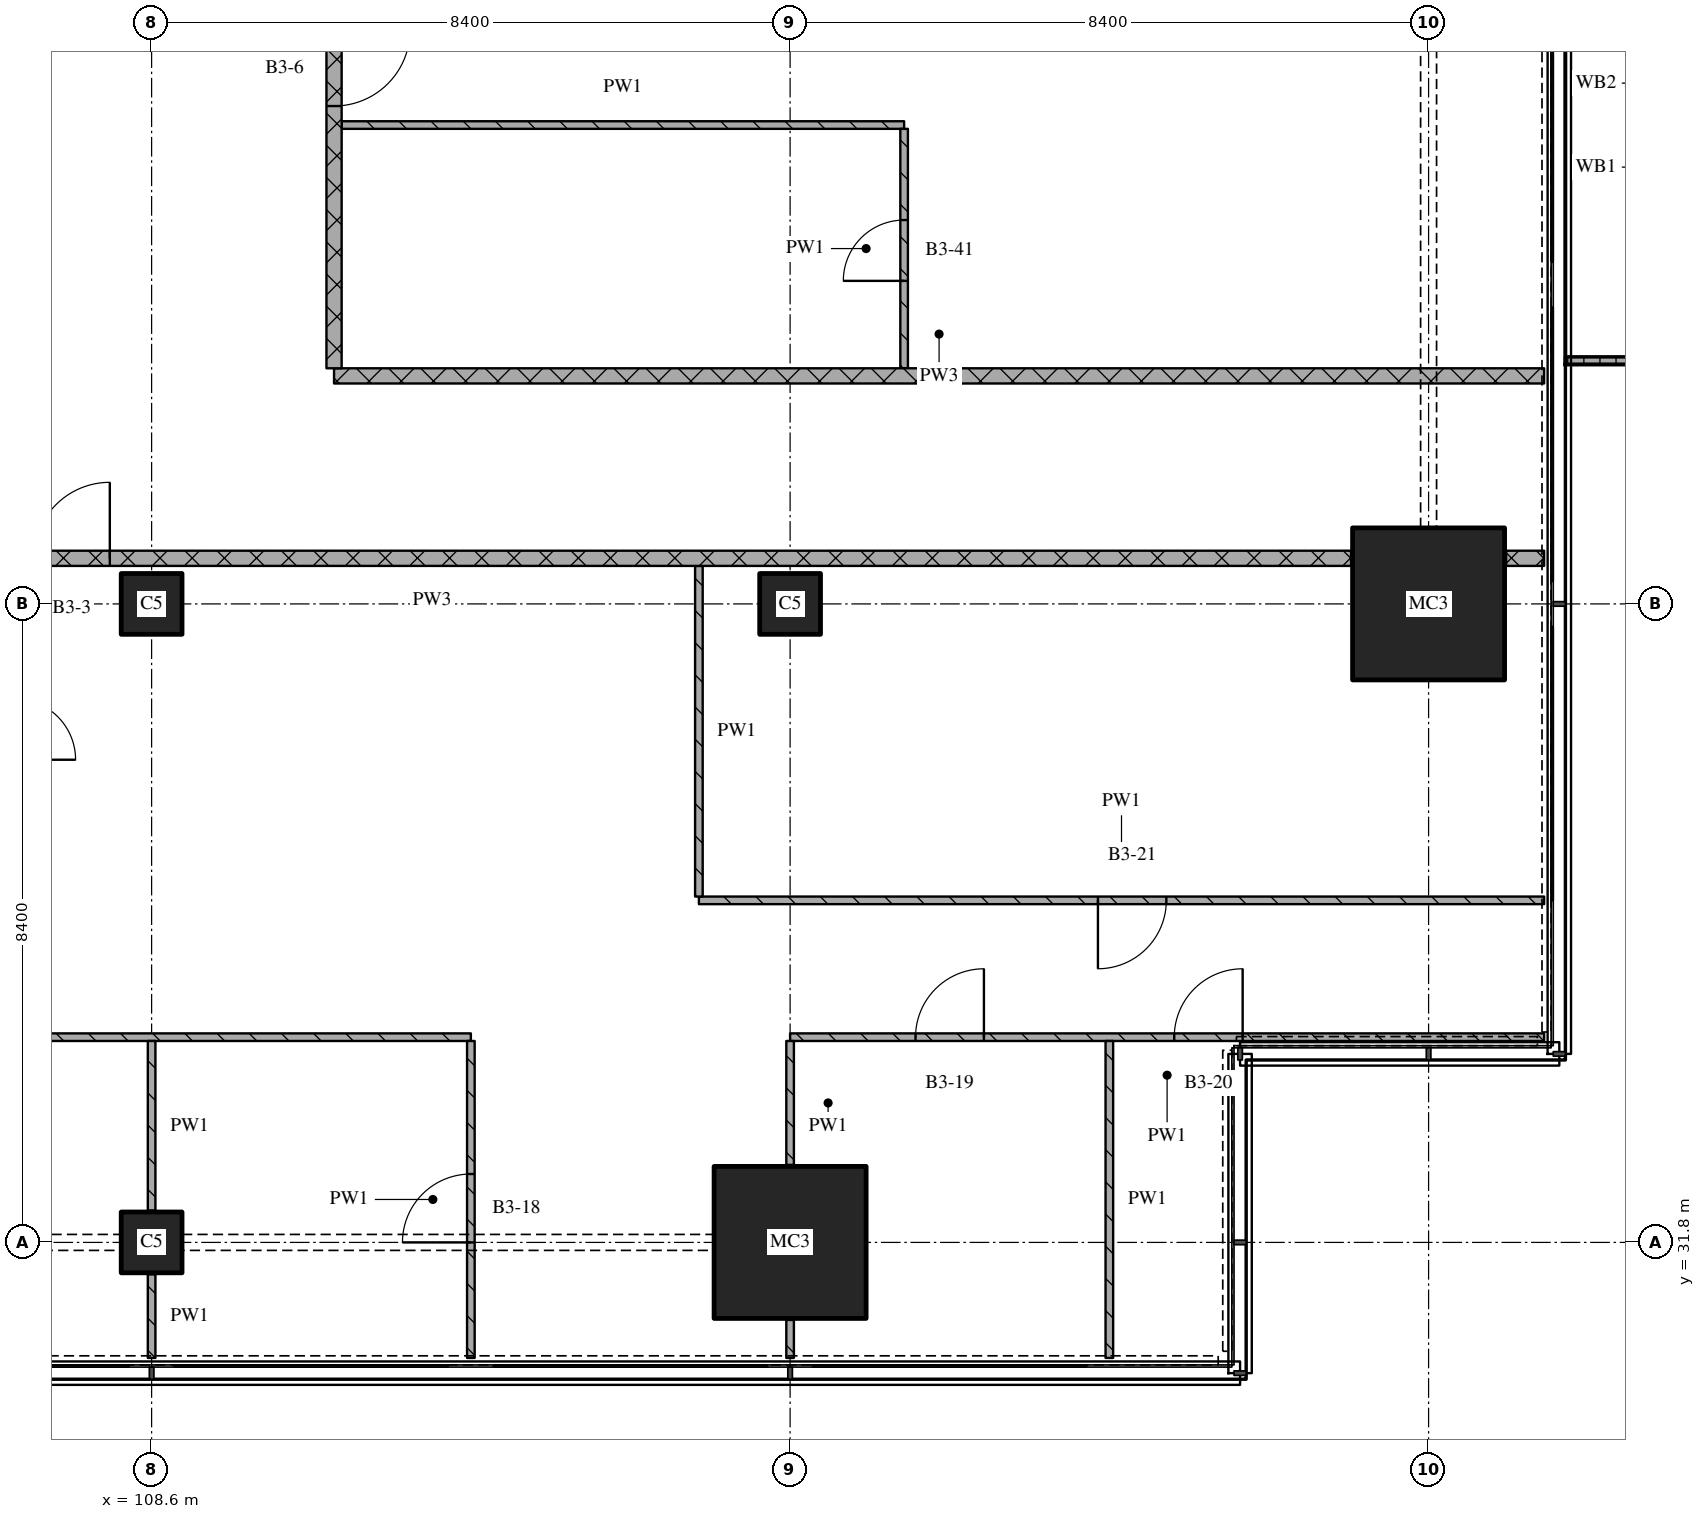
"""IFC4 building model, lengths in metres.
Left out: names, types, materials, properties, quantities, classifications, styles, units other than length and angle.
Written with IfcOpenShell. Run it as: python <this file> out.ifc"""

import sys

from ifc_helpers import new_model, si_unit, direction, frame, frame_2d, origin, origin_2d, place, context, subcontext, project, spatial, polyline, rectangle, outline, extrude, element, fill, save


model = new_model("IFC4")
c1 = context("Model", 3, precision=1e-05, world=origin(), true_north=direction((0.0, 1.0)))
c2 = subcontext(c1, "Body", "Model", "MODEL_VIEW")
j1 = project(units=[si_unit("LENGTHUNIT", "METRE"), si_unit("PLANEANGLEUNIT", "RADIAN")], contexts=[c1])
p1 = place(None, origin())
s1 = spatial("IfcSite", under=j1, at=p1, CompositionType="ELEMENT")
p2 = place(p1, origin())
s2 = spatial("IfcBuilding", under=s1, at=p2, CompositionType="ELEMENT")
p3 = place(p2, frame((0.0, 0.0, 124.05)))
s3 = spatial("IfcBuildingStorey", under=s2, at=p3, CompositionType="ELEMENT", Elevation=124.05)
for number, where, z_axis, x_axis in (
    (1, (108.6, 31.8, 0.0), (0.0, 0.0, 1.0), (1.0, 0.0, 0.0)),
    (2, (108.6, 40.2, 0.0), (0.0, 0.0, 1.0), (1.0, 0.0, 0.0)),
):
    element("IfcColumn", number, at=place(p3, frame(where, z_axis=z_axis, x_axis=x_axis)), inside=s3, PredefinedType="COLUMN", context=c2, shape_type="SweptSolid", body=[
        extrude(rectangle(XDim=0.8, YDim=0.8, at=origin_2d()), origin(), (0.0, 0.0, 1.0), 3.6),
    ])
p4 = place(p3, frame((117.0, 31.8, 0.0), z_axis=(0.0, 0.0, 1.0), x_axis=(1.0, 0.0, 0.0)))
e3 = element("IfcColumn", 3, at=p4, inside=s3, PredefinedType="COLUMN", context=c2, shape_type="SweptSolid", body=[
    extrude(rectangle(XDim=2.0, YDim=2.0, at=origin_2d()), origin(), (0.0, 0.0, 1.0), 3.6),
])
p5 = place(p3, frame((117.0, 40.2, 0.0), z_axis=(0.0, 0.0, 1.0), x_axis=(1.0, 0.0, 0.0)))
e4 = element("IfcColumn", 4, at=p5, inside=s3, PredefinedType="COLUMN", context=c2, shape_type="SweptSolid", body=[
    extrude(rectangle(XDim=0.8, YDim=0.8, at=origin_2d()), origin(), (0.0, 0.0, 1.0), 3.6),
])
p6 = place(p3, frame((125.4, 40.2, 0.0), z_axis=(0.0, 0.0, 1.0), x_axis=(1.0, 0.0, 0.0)))
e5 = element("IfcColumn", 5, at=p6, inside=s3, PredefinedType="COLUMN", context=c2, shape_type="SweptSolid", body=[
    extrude(rectangle(XDim=2.0, YDim=2.0, at=origin_2d()), origin(), (0.0, 0.0, 1.0), 3.6),
])
p7 = place(p3, origin())
e6 = element("IfcWall", 6, at=p7, inside=s3, PredefinedType="SOLIDWALL", context=c2, shape_type="SweptSolid", body=[
    extrude(outline(polyline([(127.2, 43.35), (127.2, 43.45), (128.967, 43.45), (128.967, 49.55), (127.2, 49.55), (127.2, 49.65), (129.067, 49.65), (129.067, 43.35), (127.2, 43.35)])), origin(), (0.0, 0.0, 1.0), 1.0),
])
p8 = place(p3, frame((112.8, 34.5, 0.0), z_axis=(0.0, 0.0, 1.0), x_axis=(-1.0, 0.0, 0.0)))
e7 = element("IfcWall", 7, at=p8, inside=s3, PredefinedType="PARTITIONING", context=c2, shape_type="SweptSolid", body=[
    extrude(rectangle(XDim=12.5, YDim=0.1, at=frame_2d((6.25, 0.0))), origin(), (0.0, 0.0, 1.0), 3.32),
])
p9 = place(p8, frame((7.95, 0.0, 0.0)))
e8 = element("IfcOpeningElement", 8, at=p9, cuts=e7, PredefinedType="OPENING", context=c2, shape_type="SweptSolid", body=[
    extrude(rectangle(XDim=0.9, YDim=2.1, at=frame_2d((0.45, 1.05))), frame((0.0, 0.06, 0.0), z_axis=(0.0, -1.0, 0.0), x_axis=(1.0, 0.0, 0.0)), (0.0, 0.0, 1.0), 0.12),
])
p10 = place(p3, frame((126.92, 34.5, 0.0), z_axis=(0.0, 0.0, 1.0), x_axis=(-1.0, 0.0, 0.0)))
e9 = element("IfcWall", 9, at=p10, inside=s3, PredefinedType="PARTITIONING", context=c2, shape_type="SweptSolid", body=[
    extrude(rectangle(XDim=9.92, YDim=0.1, at=frame_2d((4.96, 0.0))), origin(), (0.0, 0.0, 1.0), 3.32),
])
p11 = place(p10, frame((3.966, 0.0, 0.0)))
e10 = element("IfcOpeningElement", 10, at=p11, cuts=e9, PredefinedType="OPENING", context=c2, shape_type="SweptSolid", body=[
    extrude(rectangle(XDim=0.9, YDim=2.1, at=frame_2d((0.45, 1.05))), frame((0.0, 0.06, 0.0), z_axis=(0.0, -1.0, 0.0), x_axis=(1.0, 0.0, 0.0)), (0.0, 0.0, 1.0), 0.12),
])
p12 = place(p10, frame((7.37, 0.0, 0.0)))
e11 = element("IfcOpeningElement", 11, at=p12, cuts=e9, PredefinedType="OPENING", context=c2, shape_type="SweptSolid", body=[
    extrude(rectangle(XDim=0.9, YDim=2.1, at=frame_2d((0.45, 1.05))), frame((0.0, 0.06, 0.0), z_axis=(0.0, -1.0, 0.0), x_axis=(1.0, 0.0, 0.0)), (0.0, 0.0, 1.0), 0.12),
])
p13 = place(p3, frame((115.8, 36.3, 0.0), z_axis=(0.0, 0.0, 1.0), x_axis=(1.0, 0.0, 0.0)))
e12 = element("IfcWall", 12, at=p13, inside=s3, PredefinedType="PARTITIONING", context=c2, shape_type="SweptSolid", body=[
    extrude(rectangle(XDim=11.12, YDim=0.1, at=frame_2d((5.56, 0.0))), origin(), (0.0, 0.0, 1.0), 3.32),
])
p14 = place(p13, frame((5.25, 0.0, 0.0)))
e13 = element("IfcOpeningElement", 13, at=p14, cuts=e12, PredefinedType="OPENING", context=c2, shape_type="SweptSolid", body=[
    extrude(rectangle(XDim=0.9, YDim=2.1, at=frame_2d((0.45, 1.05))), frame((0.0, 0.06, 0.0), z_axis=(0.0, -1.0, 0.0), x_axis=(1.0, 0.0, 0.0)), (0.0, 0.0, 1.0), 0.12),
])
p15 = place(p3, frame((124.38, 40.8, 0.0), z_axis=(0.0, 0.0, 1.0), x_axis=(-1.0, 0.0, 0.0)))
e14 = element("IfcWall", 14, at=p15, inside=s3, PredefinedType="PARTITIONING", context=c2, shape_type="SweptSolid", body=[
    extrude(rectangle(XDim=24.18, YDim=0.2, at=frame_2d((12.09, 0.0))), origin(), (0.0, 0.0, 1.0), 3.32),
])
p16 = place(p15, frame((16.33, 0.0, 0.0)))
e15 = element("IfcOpeningElement", 15, at=p16, cuts=e14, PredefinedType="OPENING", context=c2, shape_type="SweptSolid", body=[
    extrude(rectangle(XDim=1.0, YDim=2.1, at=frame_2d((0.5, 1.05))), frame((0.0, 0.11, 0.0), z_axis=(0.0, -1.0, 0.0), x_axis=(1.0, 0.0, 0.0)), (0.0, 0.0, 1.0), 0.22),
])
p17 = place(p3, frame((126.42, 40.8, 0.0), z_axis=(0.0, 0.0, 1.0), x_axis=(1.0, 0.0, 0.0)))
e16 = element("IfcWall", 16, at=p17, inside=s3, PredefinedType="PARTITIONING", context=c2, shape_type="SweptSolid", body=[
    extrude(rectangle(XDim=0.5, YDim=0.2, at=frame_2d((0.25, 0.0))), origin(), (0.0, 0.0, 1.0), 3.32),
])
p18 = place(p3, frame((111.0, 43.2, 0.0), z_axis=(0.0, 0.0, 1.0), x_axis=(1.0, 0.0, 0.0)))
e17 = element("IfcWall", 17, at=p18, inside=s3, PredefinedType="PARTITIONING", context=c2, shape_type="SweptSolid", body=[
    extrude(rectangle(XDim=15.92, YDim=0.2, at=frame_2d((7.96, 0.0))), origin(), (0.0, 0.0, 1.0), 3.32),
])
p19 = place(p3, frame((111.1, 46.5, 0.0), z_axis=(0.0, 0.0, 1.0), x_axis=(1.0, 0.0, 0.0)))
e18 = element("IfcWall", 18, at=p19, inside=s3, PredefinedType="PARTITIONING", context=c2, shape_type="SweptSolid", body=[
    extrude(rectangle(XDim=7.4, YDim=0.1, at=frame_2d((3.7, 0.0))), origin(), (0.0, 0.0, 1.0), 3.32),
])
p20 = place(p3, frame((108.6, 31.38, 0.0), z_axis=(0.0, 0.0, 1.0), x_axis=(0.0, -1.0, 0.0)))
e19 = element("IfcWall", 19, at=p20, inside=s3, PredefinedType="PARTITIONING", context=c2, shape_type="SweptSolid", body=[
    extrude(rectangle(XDim=1.1, YDim=0.1, at=frame_2d((0.55, 0.0))), origin(), (0.0, 0.0, 1.0), 3.32),
])
p21 = place(p3, frame((108.6, 34.45, 0.0), z_axis=(0.0, 0.0, 1.0), x_axis=(0.0, -1.0, 0.0)))
e20 = element("IfcWall", 20, at=p21, inside=s3, PredefinedType="PARTITIONING", context=c2, shape_type="SweptSolid", body=[
    extrude(rectangle(XDim=2.23, YDim=0.1, at=frame_2d((1.115, 0.0))), origin(), (0.0, 0.0, 1.0), 3.32),
])
p22 = place(p3, frame((111.0, 75.32, 0.0), z_axis=(0.0, 0.0, 1.0), x_axis=(0.0, -1.0, 0.0)))
e21 = element("IfcWall", 21, at=p22, inside=s3, PredefinedType="PARTITIONING", context=c2, shape_type="SweptSolid", body=[
    extrude(rectangle(XDim=32.02, YDim=0.2, at=frame_2d((16.01, 0.0))), origin(), (0.0, 0.0, 1.0), 3.32),
])
p23 = place(p22, frame((11.37, 0.0, 0.0)))
e22 = element("IfcOpeningElement", 22, at=p23, cuts=e21, PredefinedType="OPENING", context=c2, shape_type="SweptSolid", body=[
    extrude(rectangle(XDim=1.0, YDim=2.1, at=frame_2d((0.5, 1.05))), frame((0.0, 0.11, 0.0), z_axis=(0.0, -1.0, 0.0), x_axis=(1.0, 0.0, 0.0)), (0.0, 0.0, 1.0), 0.22),
])
p24 = place(p22, frame((27.57, 0.0, 0.0)))
e23 = element("IfcOpeningElement", 23, at=p24, cuts=e21, PredefinedType="OPENING", context=c2, shape_type="SweptSolid", body=[
    extrude(rectangle(XDim=1.0, YDim=2.1, at=frame_2d((0.5, 1.05))), frame((0.0, 0.11, 0.0), z_axis=(0.0, -1.0, 0.0), x_axis=(1.0, 0.0, 0.0)), (0.0, 0.0, 1.0), 0.22),
])
p25 = place(p3, frame((112.8, 30.28, 0.0), z_axis=(0.0, 0.0, 1.0), x_axis=(0.0, 1.0, 0.0)))
e24 = element("IfcWall", 24, at=p25, inside=s3, PredefinedType="PARTITIONING", context=c2, shape_type="SweptSolid", body=[
    extrude(rectangle(XDim=4.17, YDim=0.1, at=frame_2d((2.085, 0.0))), origin(), (0.0, 0.0, 1.0), 3.32),
])
p26 = place(p25, frame((1.52, 0.0, 0.0)))
e25 = element("IfcOpeningElement", 25, at=p26, cuts=e24, PredefinedType="OPENING", context=c2, shape_type="SweptSolid", body=[
    extrude(rectangle(XDim=0.9, YDim=2.1, at=frame_2d((0.45, 1.05))), frame((0.0, 0.06, 0.0), z_axis=(0.0, -1.0, 0.0), x_axis=(1.0, 0.0, 0.0)), (0.0, 0.0, 1.0), 0.12),
])
p27 = place(p3, frame((115.8, 40.7, 0.0), z_axis=(0.0, 0.0, 1.0), x_axis=(0.0, -1.0, 0.0)))
e26 = element("IfcWall", 26, at=p27, inside=s3, PredefinedType="PARTITIONING", context=c2, shape_type="SweptSolid", body=[
    extrude(rectangle(XDim=4.35, YDim=0.1, at=frame_2d((2.175, 0.0))), origin(), (0.0, 0.0, 1.0), 3.32),
])
p28 = place(p3, frame((117.0, 30.78, 0.0), z_axis=(0.0, 0.0, 1.0), x_axis=(0.0, -1.0, 0.0)))
e27 = element("IfcWall", 27, at=p28, inside=s3, PredefinedType="PARTITIONING", context=c2, shape_type="SweptSolid", body=[
    extrude(rectangle(XDim=0.5, YDim=0.1, at=frame_2d((0.25, 0.0))), origin(), (0.0, 0.0, 1.0), 3.32),
])
p29 = place(p3, frame((117.0, 34.45, 0.0), z_axis=(0.0, 0.0, 1.0), x_axis=(0.0, -1.0, 0.0)))
e28 = element("IfcWall", 28, at=p29, inside=s3, PredefinedType="PARTITIONING", context=c2, shape_type="SweptSolid", body=[
    extrude(rectangle(XDim=1.63, YDim=0.1, at=frame_2d((0.815, 0.0))), origin(), (0.0, 0.0, 1.0), 3.32),
])
p30 = place(p3, frame((118.5, 43.3, 0.0), z_axis=(0.0, 0.0, 1.0), x_axis=(0.0, 1.0, 0.0)))
e29 = element("IfcWall", 29, at=p30, inside=s3, PredefinedType="PARTITIONING", context=c2, shape_type="SweptSolid", body=[
    extrude(rectangle(XDim=3.15, YDim=0.1, at=frame_2d((1.575, 0.0))), origin(), (0.0, 0.0, 1.0), 3.32),
])
p31 = place(p30, frame((1.15, 0.0, 0.0)))
e30 = element("IfcOpeningElement", 30, at=p31, cuts=e29, PredefinedType="OPENING", context=c2, shape_type="SweptSolid", body=[
    extrude(rectangle(XDim=0.8, YDim=2.1, at=frame_2d((0.4, 1.05))), frame((0.0, 0.06, 0.0), z_axis=(0.0, -1.0, 0.0), x_axis=(1.0, 0.0, 0.0)), (0.0, 0.0, 1.0), 0.12),
])
p32 = place(p3, frame((121.2, 34.45, 0.0), z_axis=(0.0, 0.0, 1.0), x_axis=(0.0, -1.0, 0.0)))
e31 = element("IfcWall", 31, at=p32, inside=s3, PredefinedType="PARTITIONING", context=c2, shape_type="SweptSolid", body=[
    extrude(rectangle(XDim=4.17, YDim=0.1, at=frame_2d((2.085, 0.0))), origin(), (0.0, 0.0, 1.0), 3.32),
])
p33 = place(p11, origin())
e32 = element("IfcDoor", 32, at=p33, inside=s3, OperationType="SINGLE_SWING_RIGHT", PredefinedType="DOOR", context=c2, shape_type="SweptSolid", body=[
    extrude(rectangle(XDim=0.9, YDim=2.1, at=frame_2d((0.45, 1.05))), frame((0.0, 0.025, 0.0), z_axis=(0.0, -1.0, 0.0), x_axis=(1.0, 0.0, 0.0)), (0.0, 0.0, 1.0), 0.05),
])
fill(e10, e32)
p34 = place(p12, origin())
e33 = element("IfcDoor", 33, at=p34, inside=s3, OperationType="SINGLE_SWING_RIGHT", PredefinedType="DOOR", context=c2, shape_type="SweptSolid", body=[
    extrude(rectangle(XDim=0.9, YDim=2.1, at=frame_2d((0.45, 1.05))), frame((0.0, 0.025, 0.0), z_axis=(0.0, -1.0, 0.0), x_axis=(1.0, 0.0, 0.0)), (0.0, 0.0, 1.0), 0.05),
])
fill(e11, e33)
p35 = place(p14, origin())
e34 = element("IfcDoor", 34, at=p35, inside=s3, OperationType="SINGLE_SWING_RIGHT", PredefinedType="DOOR", context=c2, shape_type="SweptSolid", body=[
    extrude(rectangle(XDim=0.9, YDim=2.1, at=frame_2d((0.45, 1.05))), frame((0.0, 0.025, 0.0), z_axis=(0.0, -1.0, 0.0), x_axis=(1.0, 0.0, 0.0)), (0.0, 0.0, 1.0), 0.05),
])
fill(e13, e34)
p36 = place(p16, origin())
e35 = element("IfcDoor", 35, at=p36, inside=s3, OperationType="SINGLE_SWING_RIGHT", PredefinedType="DOOR", context=c2, shape_type="SweptSolid", body=[
    extrude(rectangle(XDim=1.0, YDim=2.1, at=frame_2d((0.5, 1.05))), frame((0.0, 0.025, 0.0), z_axis=(0.0, -1.0, 0.0), x_axis=(1.0, 0.0, 0.0)), (0.0, 0.0, 1.0), 0.05),
])
fill(e15, e35)
p37 = place(p24, origin())
e36 = element("IfcDoor", 36, at=p37, inside=s3, OperationType="SINGLE_SWING_LEFT", PredefinedType="DOOR", context=c2, shape_type="SweptSolid", body=[
    extrude(rectangle(XDim=1.0, YDim=2.1, at=frame_2d((0.5, 1.05))), frame((0.0, 0.025, 0.0), z_axis=(0.0, -1.0, 0.0), x_axis=(1.0, 0.0, 0.0)), (0.0, 0.0, 1.0), 0.05),
])
fill(e23, e36)
p38 = place(p26, origin())
e37 = element("IfcDoor", 37, at=p38, inside=s3, OperationType="SINGLE_SWING_LEFT", PredefinedType="DOOR", context=c2, shape_type="SweptSolid", body=[
    extrude(rectangle(XDim=0.9, YDim=2.1, at=frame_2d((0.45, 1.05))), frame((0.0, 0.025, 0.0), z_axis=(0.0, -1.0, 0.0), x_axis=(1.0, 0.0, 0.0)), (0.0, 0.0, 1.0), 0.05),
])
fill(e25, e37)
p39 = place(p31, origin())
e38 = element("IfcDoor", 38, at=p39, inside=s3, OperationType="SINGLE_SWING_LEFT", PredefinedType="DOOR", context=c2, shape_type="SweptSolid", body=[
    extrude(rectangle(XDim=0.8, YDim=2.1, at=frame_2d((0.4, 1.05))), frame((0.0, 0.025, 0.0), z_axis=(0.0, -1.0, 0.0), x_axis=(1.0, 0.0, 0.0)), (0.0, 0.0, 1.0), 0.05),
])
fill(e30, e38)
save(model, sys.argv[1])
